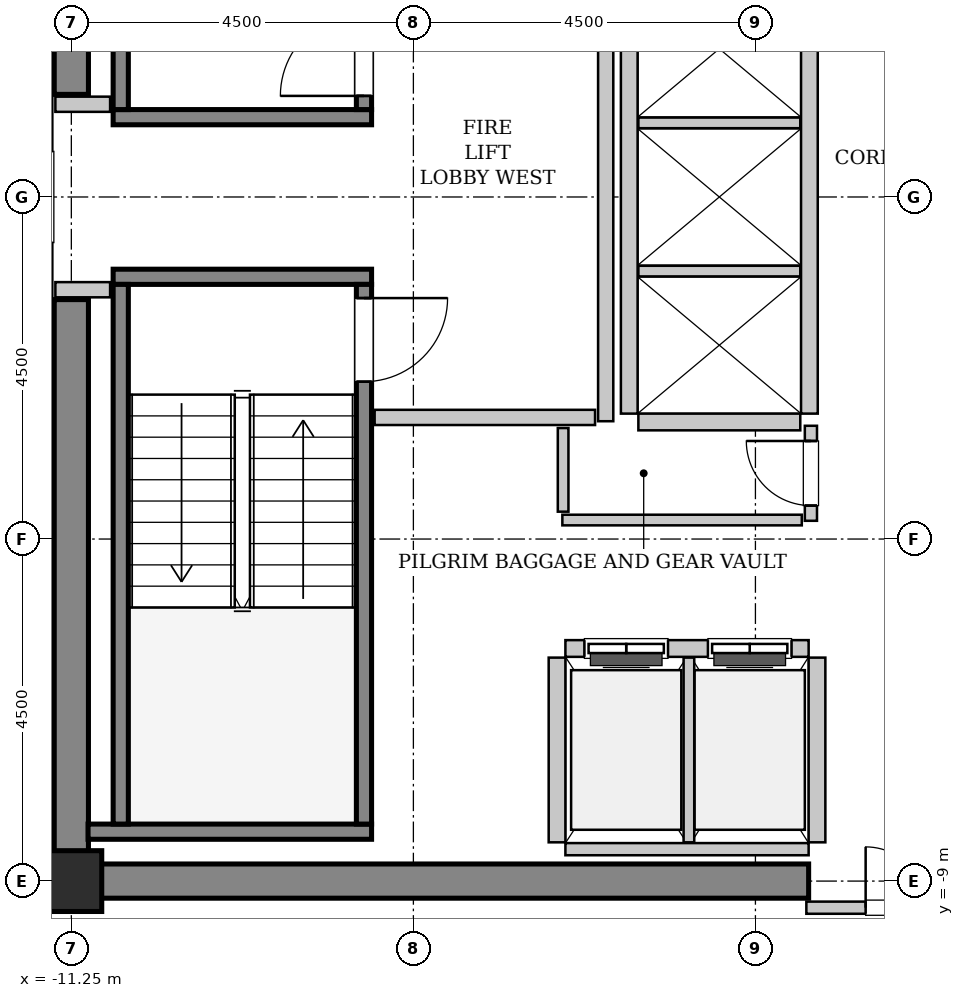
"""IFC4 building model, lengths in metres.
Left out: names, types, materials, properties, quantities, classifications, styles, units other than length and angle.
Written with IfcOpenShell. Run it as: python <this file> out.ifc"""

import sys

from ifc_helpers import new_model, si_unit, direction, frame, frame_2d, origin, origin_2d, place, context, subcontext, project, spatial, rectangle, hollow_rectangle, extrude, source, transform, mapped, element, fill, save


model = new_model("IFC4")
c1 = context("Model", 3, precision=1e-05, world=origin(), true_north=direction((0.0, 1.0)))
c2 = subcontext(c1, "Body", "Model", "MODEL_VIEW")
j1 = project(units=[si_unit("LENGTHUNIT", "METRE"), si_unit("PLANEANGLEUNIT", "RADIAN")], contexts=[c1])
p1 = place(None, origin())
s1 = spatial("IfcSite", under=j1, at=p1, CompositionType="ELEMENT")
p2 = place(p1, origin())
s2 = spatial("IfcBuilding", under=s1, at=p2, CompositionType="ELEMENT")
p3 = place(p2, frame((0.0, 0.0, 229.4)))
s3 = spatial("IfcBuildingStorey", under=s2, at=p3, CompositionType="ELEMENT", Elevation=229.4)
m1 = source(origin(), c2, "Body", "SweptSolid", [
    extrude(rectangle(XDim=9.925, YDim=0.45, at=frame_2d((4.962, 0.0))), origin(), (0.0, 0.0, 1.0), 3.8),
])
p4 = place(p3, frame((-11.475, -9.0, 0.0), z_axis=(0.0, 0.0, 1.0), x_axis=(1.0, 0.0, 0.0)))
e1 = element("IfcWall", 1, at=p4, inside=s3, PredefinedType="SHEAR", context=c2, shape_type="MappedRepresentation", body=[
    mapped(m1, transform((0.0, 0.0, 0.0), x_axis=(1.0, 0.0, 0.0), y_axis=(0.0, 1.0, 0.0), z_axis=(0.0, 0.0, 1.0), scale=1.0)),
])
m2 = source(origin(), c2, "Body", "SweptSolid", [
    extrude(rectangle(XDim=7.425, YDim=0.45, at=frame_2d((3.712, 0.0))), origin(), (0.0, 0.0, 1.0), 3.8),
])
for number, where, z_axis, x_axis in (
    (2, (-11.25, -8.775, 0.0), (0.0, 0.0, 1.0), (0.0, 1.0, 0.0)),
    (3, (-11.25, 1.35, 0.0), (0.0, 0.0, 1.0), (0.0, 1.0, 0.0)),
):
    element("IfcWall", number, at=place(p3, frame(where, z_axis=z_axis, x_axis=x_axis)), inside=s3, PredefinedType="SHEAR", context=c2, shape_type="MappedRepresentation", body=[
        mapped(m2, transform((0.0, 0.0, 0.0), x_axis=(1.0, 0.0, 0.0), y_axis=(0.0, 1.0, 0.0), z_axis=(0.0, 0.0, 1.0), scale=1.0)),
    ])
m3 = source(origin(), c2, "Body", "SweptSolid", [
    extrude(hollow_rectangle(XDim=0.8, YDim=0.8, WallThickness=0.04, InnerFilletRadius=0.04, OuterFilletRadius=0.08, at=origin_2d()), origin(), (0.0, 0.0, 1.0), 3.8),
])
p5 = place(p3, frame((-11.25, -9.0, 0.0), z_axis=(0.0, 0.0, 1.0), x_axis=(1.0, 0.0, 0.0)))
e4 = element("IfcColumn", 4, at=p5, inside=s3, PredefinedType="COLUMN", context=c2, shape_type="MappedRepresentation", body=[
    mapped(m3, transform((0.0, 0.0, 0.0), x_axis=(1.0, 0.0, 0.0), y_axis=(0.0, 1.0, 0.0), z_axis=(0.0, 0.0, 1.0), scale=1.0)),
])
m4 = source(origin(), c2, "Body", "SweptSolid", [
    extrude(rectangle(XDim=3.4, YDim=0.2, at=frame_2d((1.7, 0.0))), origin(), (0.0, 0.0, 1.0), 3.8),
])
p6 = place(p3, frame((-7.3, 1.05, 0.0), z_axis=(0.0, 0.0, 1.0), x_axis=(-1.0, 0.0, 0.0)))
e5 = element("IfcWall", 5, at=p6, inside=s3, PredefinedType="SOLIDWALL", context=c2, shape_type="MappedRepresentation", body=[
    mapped(m4, transform((0.0, 0.0, 0.0), x_axis=(1.0, 0.0, 0.0), y_axis=(0.0, 1.0, 0.0), z_axis=(0.0, 0.0, 1.0), scale=1.0)),
])
m5 = source(origin(), c2, "Body", "SweptSolid", [
    extrude(rectangle(XDim=7.1, YDim=0.2, at=frame_2d((3.55, 0.0))), origin(), (0.0, 0.0, 1.0), 3.8),
])
p7 = place(p3, frame((-7.4, 1.15, 0.0), z_axis=(0.0, 0.0, 1.0), x_axis=(0.0, 1.0, 0.0)))
e6 = element("IfcWall", 6, at=p7, inside=s3, PredefinedType="SOLIDWALL", context=c2, shape_type="MappedRepresentation", body=[
    mapped(m5, transform((0.0, 0.0, 0.0), x_axis=(1.0, 0.0, 0.0), y_axis=(0.0, 1.0, 0.0), z_axis=(0.0, 0.0, 1.0), scale=1.0)),
])
p8 = place(p7, frame((0.18, 0.0, 0.0)))
e7 = element("IfcOpeningElement", 7, at=p8, cuts=e6, PredefinedType="OPENING", context=c2, shape_type="SweptSolid", body=[
    extrude(rectangle(XDim=1.1, YDim=2.15, at=frame_2d((0.55, 1.075))), frame((0.0, 0.11, 0.0), z_axis=(0.0, -1.0, 0.0), x_axis=(1.0, 0.0, 0.0)), (0.0, 0.0, 1.0), 0.22),
])
p9 = place(p3, frame((-10.6, 1.15, 0.0), z_axis=(0.0, 0.0, 1.0), x_axis=(0.0, 1.0, 0.0)))
e8 = element("IfcWall", 8, at=p9, inside=s3, PredefinedType="SOLIDWALL", context=c2, shape_type="MappedRepresentation", body=[
    mapped(m5, transform((0.0, 0.0, 0.0), x_axis=(1.0, 0.0, 0.0), y_axis=(0.0, 1.0, 0.0), z_axis=(0.0, 0.0, 1.0), scale=1.0)),
])
p10 = place(p3, frame((-10.7, -1.05, 0.0), z_axis=(0.0, 0.0, 1.0), x_axis=(1.0, 0.0, 0.0)))
e9 = element("IfcWall", 9, at=p10, inside=s3, PredefinedType="SOLIDWALL", context=c2, shape_type="MappedRepresentation", body=[
    mapped(m4, transform((0.0, 0.0, 0.0), x_axis=(1.0, 0.0, 0.0), y_axis=(0.0, 1.0, 0.0), z_axis=(0.0, 0.0, 1.0), scale=1.0)),
])
m6 = source(origin(), c2, "Body", "SweptSolid", [
    extrude(rectangle(XDim=3.73, YDim=0.2, at=frame_2d((1.865, 0.0))), origin(), (0.0, 0.0, 1.0), 3.8),
])
p11 = place(p3, frame((-11.03, -8.35, 0.0), z_axis=(0.0, 0.0, 1.0), x_axis=(1.0, 0.0, 0.0)))
e10 = element("IfcWall", 10, at=p11, inside=s3, PredefinedType="SOLIDWALL", context=c2, shape_type="MappedRepresentation", body=[
    mapped(m6, transform((0.0, 0.0, 0.0), x_axis=(1.0, 0.0, 0.0), y_axis=(0.0, 1.0, 0.0), z_axis=(0.0, 0.0, 1.0), scale=1.0)),
])
p12 = place(p3, frame((-10.6, -1.15, 0.0), z_axis=(0.0, 0.0, 1.0), x_axis=(0.0, -1.0, 0.0)))
e11 = element("IfcWall", 11, at=p12, inside=s3, PredefinedType="SOLIDWALL", context=c2, shape_type="MappedRepresentation", body=[
    mapped(m5, transform((0.0, 0.0, 0.0), x_axis=(1.0, 0.0, 0.0), y_axis=(0.0, 1.0, 0.0), z_axis=(0.0, 0.0, 1.0), scale=1.0)),
])
p13 = place(p3, frame((-7.4, -1.15, 0.0), z_axis=(0.0, 0.0, 1.0), x_axis=(0.0, -1.0, 0.0)))
e12 = element("IfcWall", 12, at=p13, inside=s3, PredefinedType="SOLIDWALL", context=c2, shape_type="MappedRepresentation", body=[
    mapped(m5, transform((0.0, 0.0, 0.0), x_axis=(1.0, 0.0, 0.0), y_axis=(0.0, 1.0, 0.0), z_axis=(0.0, 0.0, 1.0), scale=1.0)),
])
p14 = place(p13, frame((0.18, 0.0, 0.0)))
e13 = element("IfcOpeningElement", 13, at=p14, cuts=e12, PredefinedType="OPENING", context=c2, shape_type="SweptSolid", body=[
    extrude(rectangle(XDim=1.1, YDim=2.15, at=frame_2d((0.55, 1.075))), frame((0.0, 0.11, 0.0), z_axis=(0.0, -1.0, 0.0), x_axis=(1.0, 0.0, 0.0)), (0.0, 0.0, 1.0), 0.22),
])
m7 = source(origin(), c2, "Body", "SweptSolid", [
    extrude(rectangle(XDim=3.2, YDim=0.22, at=frame_2d((1.6, 0.0))), origin(), (0.0, 0.0, 1.0), 3.535),
])
p15 = place(p3, frame((-1.55, -5.94, 0.0), z_axis=(0.0, 0.0, 1.0), x_axis=(-1.0, 0.0, 0.0)))
e14 = element("IfcWall", 14, at=p15, inside=s3, PredefinedType="SOLIDWALL", context=c2, shape_type="MappedRepresentation", body=[
    mapped(m7, transform((0.0, 0.0, 0.0), x_axis=(1.0, 0.0, 0.0), y_axis=(0.0, 1.0, 0.0), z_axis=(0.0, 0.0, 1.0), scale=1.0)),
])
p16 = place(p15, frame((1.85, 0.0, 0.0)))
e15 = element("IfcOpeningElement", 15, at=p16, cuts=e14, PredefinedType="OPENING", context=c2, shape_type="SweptSolid", body=[
    extrude(rectangle(XDim=1.1, YDim=2.2, at=frame_2d((0.55, 1.1))), frame((0.0, 0.12, 0.0), z_axis=(0.0, -1.0, 0.0), x_axis=(1.0, 0.0, 0.0)), (0.0, 0.0, 1.0), 0.24),
])
p17 = place(p15, frame((0.225, 0.0, 0.0)))
e16 = element("IfcOpeningElement", 16, at=p17, cuts=e14, PredefinedType="OPENING", context=c2, shape_type="SweptSolid", body=[
    extrude(rectangle(XDim=1.1, YDim=2.2, at=frame_2d((0.55, 1.1))), frame((0.0, 0.12, 0.0), z_axis=(0.0, -1.0, 0.0), x_axis=(1.0, 0.0, 0.0)), (0.0, 0.0, 1.0), 0.24),
])
m8 = source(origin(), c2, "Body", "SweptSolid", [
    extrude(rectangle(XDim=3.2, YDim=0.16, at=frame_2d((1.6, 0.0))), origin(), (0.0, 0.0, 1.0), 2.625),
])
p18 = place(p3, frame((-4.75, -8.58, 0.0), z_axis=(0.0, 0.0, 1.0), x_axis=(1.0, 0.0, 0.0)))
e17 = element("IfcWall", 17, at=p18, inside=s3, PredefinedType="PARTITIONING", context=c2, shape_type="MappedRepresentation", body=[
    mapped(m8, transform((0.0, 0.0, 0.0), x_axis=(1.0, 0.0, 0.0), y_axis=(0.0, 1.0, 0.0), z_axis=(0.0, 0.0, 1.0), scale=1.0)),
])
m9 = source(origin(), c2, "Body", "SweptSolid", [
    extrude(rectangle(XDim=2.43, YDim=0.22, at=frame_2d((1.215, 0.0))), origin(), (0.0, 0.0, 1.0), 3.535),
])
p19 = place(p3, frame((-4.86, -6.06, 0.0), z_axis=(0.0, 0.0, 1.0), x_axis=(0.0, -1.0, 0.0)))
e18 = element("IfcWall", 18, at=p19, inside=s3, PredefinedType="SOLIDWALL", context=c2, shape_type="MappedRepresentation", body=[
    mapped(m9, transform((0.0, 0.0, 0.0), x_axis=(1.0, 0.0, 0.0), y_axis=(0.0, 1.0, 0.0), z_axis=(0.0, 0.0, 1.0), scale=1.0)),
])
m10 = source(origin(), c2, "Body", "SweptSolid", [
    extrude(rectangle(XDim=2.43, YDim=0.14, at=frame_2d((1.215, 0.0))), origin(), (0.0, 0.0, 1.0), 3.535),
])
p20 = place(p3, frame((-3.125, -8.49, 0.0), z_axis=(0.0, 0.0, 1.0), x_axis=(0.0, 1.0, 0.0)))
e19 = element("IfcWall", 19, at=p20, inside=s3, PredefinedType="PARTITIONING", context=c2, shape_type="MappedRepresentation", body=[
    mapped(m10, transform((0.0, 0.0, 0.0), x_axis=(1.0, 0.0, 0.0), y_axis=(0.0, 1.0, 0.0), z_axis=(0.0, 0.0, 1.0), scale=1.0)),
])
p21 = place(p3, frame((-1.44, -8.49, 0.0), z_axis=(0.0, 0.0, 1.0), x_axis=(0.0, 1.0, 0.0)))
e20 = element("IfcWall", 20, at=p21, inside=s3, PredefinedType="SOLIDWALL", context=c2, shape_type="MappedRepresentation", body=[
    mapped(m9, transform((0.0, 0.0, 0.0), x_axis=(1.0, 0.0, 0.0), y_axis=(0.0, 1.0, 0.0), z_axis=(0.0, 0.0, 1.0), scale=1.0)),
])
m11 = source(origin(), c2, "Body", "SweptSolid", [
    extrude(rectangle(XDim=5.7, YDim=0.22, at=frame_2d((2.85, 0.0))), origin(), (0.0, 0.0, 1.0), 3.535),
])
for number, where, z_axis, x_axis in (
    (21, (-1.54, -2.85, 0.0), (0.0, 0.0, 1.0), (0.0, 1.0, 0.0)),
    (22, (-3.91, 2.85, 0.0), (0.0, 0.0, 1.0), (0.0, -1.0, 0.0)),
):
    element("IfcWall", number, at=place(p3, frame(where, z_axis=z_axis, x_axis=x_axis)), inside=s3, PredefinedType="SOLIDWALL", context=c2, shape_type="MappedRepresentation", body=[
        mapped(m11, transform((0.0, 0.0, 0.0), x_axis=(1.0, 0.0, 0.0), y_axis=(0.0, 1.0, 0.0), z_axis=(0.0, 0.0, 1.0), scale=1.0)),
    ])
m12 = source(origin(), c2, "Body", "SweptSolid", [
    extrude(rectangle(XDim=2.13, YDim=0.22, at=frame_2d((1.065, 0.0))), origin(), (0.0, 0.0, 1.0), 3.535),
])
p22 = place(p3, frame((-3.79, -2.96, 0.0), z_axis=(0.0, 0.0, 1.0), x_axis=(1.0, 0.0, 0.0)))
e23 = element("IfcWall", 23, at=p22, inside=s3, PredefinedType="SOLIDWALL", context=c2, shape_type="MappedRepresentation", body=[
    mapped(m12, transform((0.0, 0.0, 0.0), x_axis=(1.0, 0.0, 0.0), y_axis=(0.0, 1.0, 0.0), z_axis=(0.0, 0.0, 1.0), scale=1.0)),
])
m13 = source(origin(), c2, "Body", "SweptSolid", [
    extrude(rectangle(XDim=2.13, YDim=0.14, at=frame_2d((1.065, 0.0))), origin(), (0.0, 0.0, 1.0), 3.535),
])
for number, where, z_axis, x_axis in (
    (24, (-3.79, -0.975, 0.0), (0.0, 0.0, 1.0), (1.0, 0.0, 0.0)),
    (25, (-3.79, 0.975, 0.0), (0.0, 0.0, 1.0), (1.0, 0.0, 0.0)),
):
    element("IfcWall", number, at=place(p3, frame(where, z_axis=z_axis, x_axis=x_axis)), inside=s3, PredefinedType="PARTITIONING", context=c2, shape_type="MappedRepresentation", body=[
        mapped(m13, transform((0.0, 0.0, 0.0), x_axis=(1.0, 0.0, 0.0), y_axis=(0.0, 1.0, 0.0), z_axis=(0.0, 0.0, 1.0), scale=1.0)),
    ])
m14 = source(origin(), c2, "Body", "SweptSolid", [
    extrude(rectangle(XDim=5.9, YDim=0.2, at=frame_2d((2.95, 0.0))), origin(), (0.0, 0.0, 1.0), 3.535),
])
p23 = place(p3, frame((-4.22, -2.95, 0.0), z_axis=(0.0, 0.0, 1.0), x_axis=(0.0, 1.0, 0.0)))
e26 = element("IfcWall", 26, at=p23, inside=s3, PredefinedType="PARTITIONING", context=c2, shape_type="MappedRepresentation", body=[
    mapped(m14, transform((0.0, 0.0, 0.0), x_axis=(1.0, 0.0, 0.0), y_axis=(0.0, 1.0, 0.0), z_axis=(0.0, 0.0, 1.0), scale=1.0)),
])
m15 = source(origin(), c2, "Body", "SweptSolid", [
    extrude(rectangle(XDim=2.9, YDim=0.2, at=frame_2d((1.45, 0.0))), origin(), (0.0, 0.0, 1.0), 3.535),
])
p24 = place(p3, frame((-7.26, -2.9, 0.0), z_axis=(0.0, 0.0, 1.0), x_axis=(1.0, 0.0, 0.0)))
e27 = element("IfcWall", 27, at=p24, inside=s3, PredefinedType="PARTITIONING", context=c2, shape_type="MappedRepresentation", body=[
    mapped(m15, transform((0.0, 0.0, 0.0), x_axis=(1.0, 0.0, 0.0), y_axis=(0.0, 1.0, 0.0), z_axis=(0.0, 0.0, 1.0), scale=1.0)),
])
m16 = source(origin(), c2, "Body", "SweptSolid", [
    extrude(rectangle(XDim=0.72, YDim=0.2, at=frame_2d((0.36, 0.0))), origin(), (0.0, 0.0, 1.0), 3.535),
])
for number, where, z_axis, x_axis in (
    (28, (-11.46, 1.22, 0.0), (0.0, 0.0, 1.0), (1.0, 0.0, 0.0)),
    (29, (-11.46, -1.22, 0.0), (0.0, 0.0, 1.0), (1.0, 0.0, 0.0)),
):
    element("IfcWall", number, at=place(p3, frame(where, z_axis=z_axis, x_axis=x_axis)), inside=s3, PredefinedType="PARTITIONING", context=c2, shape_type="MappedRepresentation", body=[
        mapped(m16, transform((0.0, 0.0, 0.0), x_axis=(1.0, 0.0, 0.0), y_axis=(0.0, 1.0, 0.0), z_axis=(0.0, 0.0, 1.0), scale=1.0)),
    ])
m17 = source(origin(), c2, "Body", "SweptSolid", [
    extrude(rectangle(XDim=3.16, YDim=0.16, at=frame_2d((1.58, 0.0))), origin(), (0.0, 0.0, 1.0), 2.625),
])
p25 = place(p3, frame((-1.58, -9.35, 0.0), z_axis=(0.0, 0.0, 1.0), x_axis=(1.0, 0.0, 0.0)))
e30 = element("IfcWall", 30, at=p25, inside=s3, PredefinedType="PARTITIONING", context=c2, shape_type="MappedRepresentation", body=[
    mapped(m17, transform((0.0, 0.0, 0.0), x_axis=(1.0, 0.0, 0.0), y_axis=(0.0, 1.0, 0.0), z_axis=(0.0, 0.0, 1.0), scale=1.0)),
])
p26 = place(p25, frame((0.78, 0.0, 0.0)))
e31 = element("IfcOpeningElement", 31, at=p26, cuts=e30, PredefinedType="OPENING", context=c2, shape_type="SweptSolid", body=[
    extrude(rectangle(XDim=1.6, YDim=2.3, at=frame_2d((0.8, 1.15))), frame((0.0, 0.09, 0.0), z_axis=(0.0, -1.0, 0.0), x_axis=(1.0, 0.0, 0.0)), (0.0, 0.0, 1.0), 0.18),
])
m18 = source(origin(), c2, "Body", "SweptSolid", [
    extrude(rectangle(XDim=1.25, YDim=0.16, at=frame_2d((0.625, 0.0))), origin(), (0.0, 0.0, 1.0), 3.535),
])
p27 = place(p3, frame((-1.52, -4.26, 0.0), z_axis=(0.0, 0.0, 1.0), x_axis=(0.0, 1.0, 0.0)))
e32 = element("IfcWall", 32, at=p27, inside=s3, PredefinedType="PARTITIONING", context=c2, shape_type="MappedRepresentation", body=[
    mapped(m18, transform((0.0, 0.0, 0.0), x_axis=(1.0, 0.0, 0.0), y_axis=(0.0, 1.0, 0.0), z_axis=(0.0, 0.0, 1.0), scale=1.0)),
])
p28 = place(p27, frame((0.2, 0.0, 0.0)))
e33 = element("IfcOpeningElement", 33, at=p28, cuts=e32, PredefinedType="OPENING", context=c2, shape_type="SweptSolid", body=[
    extrude(rectangle(XDim=0.85, YDim=2.1, at=frame_2d((0.425, 1.05))), frame((0.0, 0.09, 0.0), z_axis=(0.0, -1.0, 0.0), x_axis=(1.0, 0.0, 0.0)), (0.0, 0.0, 1.0), 0.18),
])
m19 = source(origin(), c2, "Body", "SweptSolid", [
    extrude(rectangle(XDim=3.15, YDim=0.14, at=frame_2d((1.575, 0.0))), origin(), (0.0, 0.0, 1.0), 3.535),
])
p29 = place(p3, frame((-4.79, -4.25, 0.0), z_axis=(0.0, 0.0, 1.0), x_axis=(1.0, 0.0, 0.0)))
e34 = element("IfcWall", 34, at=p29, inside=s3, PredefinedType="PARTITIONING", context=c2, shape_type="MappedRepresentation", body=[
    mapped(m19, transform((0.0, 0.0, 0.0), x_axis=(1.0, 0.0, 0.0), y_axis=(0.0, 1.0, 0.0), z_axis=(0.0, 0.0, 1.0), scale=1.0)),
])
m20 = source(origin(), c2, "Body", "SweptSolid", [
    extrude(rectangle(XDim=1.1, YDim=0.14, at=frame_2d((0.55, 0.0))), origin(), (0.0, 0.0, 1.0), 3.535),
])
p30 = place(p3, frame((-4.78, -4.14, 0.0), z_axis=(0.0, 0.0, 1.0), x_axis=(0.0, 1.0, 0.0)))
e35 = element("IfcWall", 35, at=p30, inside=s3, PredefinedType="PARTITIONING", context=c2, shape_type="MappedRepresentation", body=[
    mapped(m20, transform((0.0, 0.0, 0.0), x_axis=(1.0, 0.0, 0.0), y_axis=(0.0, 1.0, 0.0), z_axis=(0.0, 0.0, 1.0), scale=1.0)),
])
m21 = source(origin(), c2, "Body", "SweptSolid", [
    extrude(rectangle(XDim=1.1, YDim=2.15, at=frame_2d((0.55, 1.075))), frame((0.0, 0.025, 0.0), z_axis=(0.0, -1.0, 0.0), x_axis=(1.0, 0.0, 0.0)), (0.0, 0.0, 1.0), 0.05),
])
p31 = place(p8, origin())
e36 = element("IfcDoor", 36, at=p31, inside=s3, OperationType="SINGLE_SWING_LEFT", PredefinedType="DOOR", context=c2, shape_type="MappedRepresentation", body=[
    mapped(m21, transform((0.0, 0.0, 0.0), x_axis=(1.0, 0.0, 0.0), y_axis=(0.0, 1.0, 0.0), z_axis=(0.0, 0.0, 1.0), scale=1.0)),
])
fill(e7, e36)
p32 = place(p14, origin())
e37 = element("IfcDoor", 37, at=p32, inside=s3, OperationType="SINGLE_SWING_LEFT", PredefinedType="DOOR", context=c2, shape_type="MappedRepresentation", body=[
    mapped(m21, transform((0.0, 0.0, 0.0), x_axis=(1.0, 0.0, 0.0), y_axis=(0.0, 1.0, 0.0), z_axis=(0.0, 0.0, 1.0), scale=1.0)),
])
fill(e13, e37)
m22 = source(origin(), c2, "Body", "SweptSolid", [
    extrude(rectangle(XDim=1.1, YDim=2.2, at=frame_2d((0.55, 1.1))), frame((0.0, 0.025, 0.0), z_axis=(0.0, -1.0, 0.0), x_axis=(1.0, 0.0, 0.0)), (0.0, 0.0, 1.0), 0.05),
])
p33 = place(p16, origin())
e38 = element("IfcDoor", 38, at=p33, inside=s3, OperationType="DOUBLE_DOOR_SLIDING", PredefinedType="DOOR", context=c2, shape_type="MappedRepresentation", body=[
    mapped(m22, transform((0.0, 0.0, 0.0), x_axis=(1.0, 0.0, 0.0), y_axis=(0.0, 1.0, 0.0), z_axis=(0.0, 0.0, 1.0), scale=1.0)),
])
fill(e15, e38)
p34 = place(p17, origin())
e39 = element("IfcDoor", 39, at=p34, inside=s3, OperationType="DOUBLE_DOOR_SLIDING", PredefinedType="DOOR", context=c2, shape_type="MappedRepresentation", body=[
    mapped(m22, transform((0.0, 0.0, 0.0), x_axis=(1.0, 0.0, 0.0), y_axis=(0.0, 1.0, 0.0), z_axis=(0.0, 0.0, 1.0), scale=1.0)),
])
fill(e16, e39)
m23 = source(origin(), c2, "Body", "SweptSolid", [
    extrude(rectangle(XDim=1.6, YDim=2.3, at=frame_2d((0.8, 1.15))), frame((0.0, 0.025, 0.0), z_axis=(0.0, -1.0, 0.0), x_axis=(1.0, 0.0, 0.0)), (0.0, 0.0, 1.0), 0.05),
])
p35 = place(p26, origin())
e40 = element("IfcDoor", 40, at=p35, inside=s3, OperationType="DOUBLE_DOOR_SINGLE_SWING", PredefinedType="DOOR", context=c2, shape_type="MappedRepresentation", body=[
    mapped(m23, transform((0.0, 0.0, 0.0), x_axis=(1.0, 0.0, 0.0), y_axis=(0.0, 1.0, 0.0), z_axis=(0.0, 0.0, 1.0), scale=1.0)),
])
fill(e31, e40)
m24 = source(origin(), c2, "Body", "SweptSolid", [
    extrude(rectangle(XDim=0.85, YDim=2.1, at=frame_2d((0.425, 1.05))), frame((0.0, 0.025, 0.0), z_axis=(0.0, -1.0, 0.0), x_axis=(1.0, 0.0, 0.0)), (0.0, 0.0, 1.0), 0.05),
])
p36 = place(p28, origin())
e41 = element("IfcDoor", 41, at=p36, inside=s3, OperationType="SINGLE_SWING_RIGHT", PredefinedType="DOOR", context=c2, shape_type="MappedRepresentation", body=[
    mapped(m24, transform((0.0, 0.0, 0.0), x_axis=(1.0, 0.0, 0.0), y_axis=(0.0, 1.0, 0.0), z_axis=(0.0, 0.0, 1.0), scale=1.0)),
])
fill(e33, e41)
save(model, sys.argv[1])
